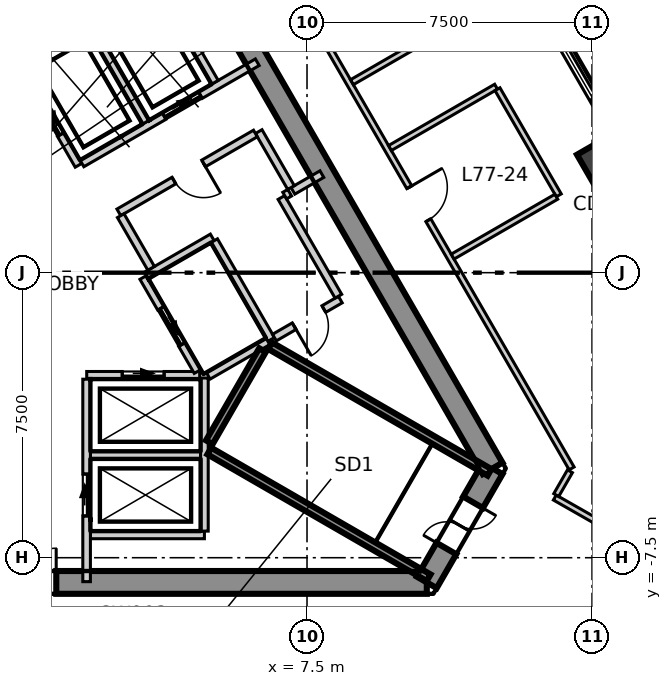
"""IFC4 building model, lengths in metres.
Left out: names, types, materials, properties, quantities, classifications, styles, units other than length and angle.
Written with IfcOpenShell. Run it as: python <this file> out.ifc"""

import sys

from ifc_helpers import new_model, si_unit, direction, frame, frame_2d, origin, origin_2d, place, context, subcontext, project, spatial, polyline, rectangle, outline, extrude, element, fill, save


model = new_model("IFC4")
c1 = context("Model", 3, precision=1e-05, world=origin(), true_north=direction((0.0, 1.0)))
c2 = subcontext(c1, "Body", "Model", "MODEL_VIEW")
j1 = project(units=[si_unit("LENGTHUNIT", "METRE"), si_unit("PLANEANGLEUNIT", "RADIAN")], contexts=[c1])
p1 = place(None, origin())
s1 = spatial("IfcSite", under=j1, at=p1, CompositionType="ELEMENT")
p2 = place(p1, origin())
s2 = spatial("IfcBuilding", under=s1, at=p2, CompositionType="ELEMENT")
p3 = place(p2, frame((0.0, 0.0, 322.3)))
s3 = spatial("IfcBuildingStorey", under=s2, at=p3, CompositionType="ELEMENT", Elevation=322.3)
p4 = place(p3, frame((-10.652, -8.15, -0.3), z_axis=(0.0, 0.0, 1.0), x_axis=(1.0, 0.0, 0.0)))
e1 = element("IfcWall", 1, at=p4, inside=s3, PredefinedType="SHEAR", context=c2, shape_type="SweptSolid", body=[
    extrude(outline(polyline([(-0.173, -0.3), (1.795, -0.3), (3.763, -0.3), (5.731, -0.3), (7.7, -0.3), (9.668, -0.3), (11.636, -0.3), (13.604, -0.3), (15.573, -0.3), (17.541, -0.3), (19.509, -0.3), (21.477, -0.3), (21.131, 0.3), (19.226, 0.3), (17.321, 0.3), (15.415, 0.3), (13.51, 0.3), (11.605, 0.3), (9.699, 0.3), (7.794, 0.3), (5.889, 0.3), (3.984, 0.3), (2.078, 0.3), (0.173, 0.3), (-0.173, -0.3)])), origin(), (0.0, 0.0, 1.0), 5.35),
])
p5 = place(p4, frame((9.752, 0.0, 0.3)))
e2 = element("IfcOpeningElement", 2, at=p5, cuts=e1, PredefinedType="OPENING", context=c2, shape_type="SweptSolid", body=[
    extrude(rectangle(XDim=1.8, YDim=2.1, at=frame_2d((0.9, 1.05))), frame((0.0, 0.31, 0.0), z_axis=(0.0, -1.0, 0.0), x_axis=(1.0, 0.0, 0.0)), (0.0, 0.0, 1.0), 0.62),
])
p6 = place(p4, frame((4.026, 0.0, 0.3)))
e3 = element("IfcOpeningElement", 3, at=p6, cuts=e1, PredefinedType="OPENING", context=c2, shape_type="SweptSolid", body=[
    extrude(rectangle(XDim=0.9, YDim=2.1, at=frame_2d((0.45, 1.05))), frame((0.0, 0.31, 0.0), z_axis=(0.0, -1.0, 0.0), x_axis=(1.0, 0.0, 0.0)), (0.0, 0.0, 1.0), 0.62),
])
p7 = place(p3, frame((10.652, -8.15, -0.3), z_axis=(0.0, 0.0, 1.0), x_axis=(0.49997462182, 0.866040055388, 0.0)))
e4 = element("IfcWall", 4, at=p7, inside=s3, PredefinedType="SHEAR", context=c2, shape_type="SweptSolid", body=[
    extrude(outline(polyline([(-0.173, -0.3), (1.732, -0.301), (3.638, -0.301), (3.291, 0.3), (1.732, 0.3), (0.173, 0.3), (-0.173, -0.3)])), origin(), (0.0, 0.0, 1.0), 5.35),
])
p8 = place(p7, frame((1.032, 0.0, 0.3)))
e5 = element("IfcOpeningElement", 5, at=p8, cuts=e4, PredefinedType="OPENING", context=c2, shape_type="SweptSolid", body=[
    extrude(rectangle(XDim=1.4, YDim=2.1, at=frame_2d((0.7, 1.05))), frame((0.0, 0.31, 0.0), z_axis=(0.0, -1.0, 0.0), x_axis=(1.0, 0.0, 0.0)), (0.0, 0.0, 1.0), 0.621),
])
p9 = place(p3, frame((12.384, -5.15, -0.3), z_axis=(0.0, 0.0, 1.0), x_axis=(-0.500000539815, 0.866025092122, 0.0)))
e6 = element("IfcWall", 6, at=p9, inside=s3, PredefinedType="SHEAR", context=c2, shape_type="SweptSolid", body=[
    extrude(outline(polyline([(-0.173, -0.301), (1.795, -0.301), (3.763, -0.301), (5.731, -0.301), (7.7, -0.301), (9.668, -0.301), (11.636, -0.301), (13.604, -0.3), (15.573, -0.3), (17.541, -0.3), (19.509, -0.3), (21.477, -0.3), (21.131, 0.3), (19.226, 0.3), (17.321, 0.3), (15.415, 0.3), (13.51, 0.3), (11.605, 0.3), (9.699, 0.3), (7.794, 0.3), (5.889, 0.3), (3.984, 0.3), (2.078, 0.3), (0.173, 0.3), (-0.173, -0.301)])), origin(), (0.0, 0.0, 1.0), 5.35),
])
p10 = place(p9, frame((16.378, 0.0, 0.3)))
e7 = element("IfcOpeningElement", 7, at=p10, cuts=e6, PredefinedType="OPENING", context=c2, shape_type="SweptSolid", body=[
    extrude(rectangle(XDim=0.9, YDim=2.1, at=frame_2d((0.45, 1.05))), frame((0.0, 0.31, 0.0), z_axis=(0.0, -1.0, 0.0), x_axis=(1.0, 0.0, 0.0)), (0.0, 0.0, 1.0), 0.621),
])
p11 = place(p3, frame((15.201, 2.871, -0.3), z_axis=(0.0, 0.0, 1.0), x_axis=(-0.5, 0.866025403784, 0.0)))
e8 = element("IfcColumn", 8, at=p11, inside=s3, PredefinedType="COLUMN", context=c2, shape_type="SweptSolid", body=[
    extrude(rectangle(XDim=1.0, YDim=0.8, at=origin_2d()), origin(), (0.0, 0.0, 1.0), 5.35),
])
p12 = place(p3, frame((2.771, 15.1, 0.0), z_axis=(0.0, 0.0, 1.0), x_axis=(0.500017691629, -0.866015189277, 0.0)))
e9 = element("IfcWall", 9, at=p12, inside=s3, PredefinedType="PARTITIONING", context=c2, shape_type="SweptSolid", body=[
    extrude(rectangle(XDim=23.383, YDim=0.15, at=frame_2d((11.691, 0.0))), origin(), (0.0, 0.0, 1.0), 5.05),
])
p13 = place(p12, frame((14.841, 0.0, 0.0)))
e10 = element("IfcOpeningElement", 10, at=p13, cuts=e9, PredefinedType="OPENING", context=c2, shape_type="SweptSolid", body=[
    extrude(rectangle(XDim=1.0, YDim=2.1, at=frame_2d((0.5, 1.05))), frame((0.0, 0.085, 0.0), z_axis=(0.0, -1.0, 0.0), x_axis=(1.0, 0.0, 0.0)), (0.0, 0.0, 1.0), 0.17),
])
p14 = place(p12, frame((5.246, 0.0, 0.0)))
e11 = element("IfcOpeningElement", 11, at=p14, cuts=e9, PredefinedType="OPENING", context=c2, shape_type="SweptSolid", body=[
    extrude(rectangle(XDim=1.2, YDim=2.1, at=frame_2d((0.6, 1.05))), frame((0.0, 0.085, 0.0), z_axis=(0.0, -1.0, 0.0), x_axis=(1.0, 0.0, 0.0)), (0.0, 0.0, 1.0), 0.17),
])
p15 = place(p3, frame((8.682, 5.012, 0.0), z_axis=(0.0, 0.0, 1.0), x_axis=(0.865981328726, 0.500076332472, 0.0)))
e12 = element("IfcWall", 12, at=p15, inside=s3, PredefinedType="PARTITIONING", context=c2, shape_type="SweptSolid", body=[
    extrude(rectangle(XDim=5.275, YDim=0.15, at=frame_2d((2.638, 0.0))), origin(), (0.0, 0.0, 1.0), 5.05),
])
p16 = place(p3, frame((9.682, 3.28, 0.0), z_axis=(0.0, 0.0, 1.0), x_axis=(0.86597507116, 0.50008716853, 0.0)))
e13 = element("IfcWall", 13, at=p16, inside=s3, PredefinedType="PARTITIONING", context=c2, shape_type="SweptSolid", body=[
    extrude(rectangle(XDim=3.226, YDim=0.15, at=frame_2d((1.613, 0.0))), origin(), (0.0, 0.0, 1.0), 5.05),
])
p17 = place(p3, frame((12.512, 4.828, 0.0), z_axis=(0.0, 0.0, 1.0), x_axis=(0.50011994908, -0.865956140074, 0.0)))
e14 = element("IfcWall", 14, at=p17, inside=s3, PredefinedType="PARTITIONING", context=c2, shape_type="SweptSolid", body=[
    extrude(rectangle(XDim=3.225, YDim=0.15, at=frame_2d((1.613, 0.0))), origin(), (0.0, 0.0, 1.0), 5.05),
])
p18 = place(p3, frame((11.332, 0.423, 0.0), z_axis=(0.0, 0.0, 1.0), x_axis=(0.866035871367, 0.499981869177, 0.0)))
e15 = element("IfcWall", 15, at=p18, inside=s3, PredefinedType="PARTITIONING", context=c2, shape_type="SweptSolid", body=[
    extrude(rectangle(XDim=3.15, YDim=0.15, at=frame_2d((1.575, 0.0))), origin(), (0.0, 0.0, 1.0), 5.05),
])
p19 = place(p3, frame((14.02, -5.917, 0.0), z_axis=(0.0, 0.0, 1.0), x_axis=(0.868887676317, -0.495009298846, 0.0)))
e16 = element("IfcWall", 16, at=p19, inside=s3, PredefinedType="PARTITIONING", context=c2, shape_type="SweptSolid", body=[
    extrude(rectangle(XDim=10.501, YDim=0.15, at=frame_2d((5.25, 0.0))), origin(), (0.0, 0.0, 1.0), 5.05),
])
p20 = place(p19, frame((4.75, 0.0, 0.0)))
e17 = element("IfcOpeningElement", 17, at=p20, cuts=e16, PredefinedType="OPENING", context=c2, shape_type="SweptSolid", body=[
    extrude(rectangle(XDim=1.0, YDim=2.1, at=frame_2d((0.5, 1.05))), frame((0.0, 0.085, 0.0), z_axis=(0.0, -1.0, 0.0), x_axis=(1.0, 0.0, 0.0)), (0.0, 0.0, 1.0), 0.17),
])
p21 = place(p3, frame((14.058, -5.852, 0.0), z_axis=(0.0, 0.0, 1.0), x_axis=(0.498826179569, 0.866702049482, 0.0)))
e18 = element("IfcWall", 18, at=p21, inside=s3, PredefinedType="PARTITIONING", context=c2, shape_type="SweptSolid", body=[
    extrude(rectangle(XDim=0.723, YDim=0.15, at=frame_2d((0.362, 0.0))), origin(), (0.0, 0.0, 1.0), 5.05),
])
p22 = place(p3, frame((1.8, -4.8, 0.0), z_axis=(0.0, 0.0, 1.0), x_axis=(1.0, 0.0, 0.0)))
e19 = element("IfcWall", 19, at=p22, inside=s3, PredefinedType="SOLIDWALL", context=c2, shape_type="SweptSolid", body=[
    extrude(rectangle(XDim=2.9, YDim=0.2, at=frame_2d((1.45, 0.0))), origin(), (0.0, 0.0, 1.0), 5.05),
])
p23 = place(p3, frame((1.8, -6.9, 0.0), z_axis=(0.0, 0.0, 1.0), x_axis=(1.0, 0.0, 0.0)))
e20 = element("IfcWall", 20, at=p23, inside=s3, PredefinedType="SOLIDWALL", context=c2, shape_type="SweptSolid", body=[
    extrude(rectangle(XDim=3.0, YDim=0.2, at=frame_2d((1.5, 0.0))), origin(), (0.0, 0.0, 1.0), 5.05),
])
p24 = place(p3, frame((1.703, -2.7, 0.0), z_axis=(0.0, 0.0, 1.0), x_axis=(1.0, 0.0, 0.0)))
e21 = element("IfcWall", 21, at=p24, inside=s3, PredefinedType="SOLIDWALL", context=c2, shape_type="SweptSolid", body=[
    extrude(rectangle(XDim=2.973, YDim=0.2, at=frame_2d((1.487, 0.0))), origin(), (0.0, 0.0, 1.0), 5.05),
])
p25 = place(p24, frame((0.936, 0.0, 0.0)))
e22 = element("IfcOpeningElement", 22, at=p25, cuts=e21, PredefinedType="OPENING", context=c2, shape_type="SweptSolid", body=[
    extrude(rectangle(XDim=1.1, YDim=2.1, at=frame_2d((0.55, 1.05))), frame((0.0, 0.11, 0.0), z_axis=(0.0, -1.0, 0.0), x_axis=(1.0, 0.0, 0.0)), (0.0, 0.0, 1.0), 0.22),
])
p26 = place(p3, frame((-0.002, 5.542, 0.0), z_axis=(0.0, 0.0, 1.0), x_axis=(0.866103910842, 0.499863997127, 0.0)))
e23 = element("IfcWall", 23, at=p26, inside=s3, PredefinedType="SOLIDWALL", context=c2, shape_type="SweptSolid", body=[
    extrude(rectangle(XDim=4.131, YDim=0.2, at=frame_2d((2.065, 0.0))), origin(), (0.0, 0.0, 1.0), 5.05),
])
p27 = place(p3, frame((0.0, 5.4, 0.0), z_axis=(0.0, 0.0, 1.0), x_axis=(0.500103862429, -0.865965430478, 0.0)))
e24 = element("IfcWall", 24, at=p27, inside=s3, PredefinedType="SOLIDWALL", context=c2, shape_type="SweptSolid", body=[
    extrude(rectangle(XDim=2.973, YDim=0.2, at=frame_2d((1.487, 0.0))), origin(), (0.0, 0.0, 1.0), 5.05),
])
p28 = place(p27, frame((0.937, 0.0, 0.0)))
e25 = element("IfcOpeningElement", 25, at=p28, cuts=e24, PredefinedType="OPENING", context=c2, shape_type="SweptSolid", body=[
    extrude(rectangle(XDim=1.1, YDim=2.1, at=frame_2d((0.55, 1.05))), frame((0.0, 0.11, 0.0), z_axis=(0.0, -1.0, 0.0), x_axis=(1.0, 0.0, 0.0)), (0.0, 0.0, 1.0), 0.22),
])
p29 = place(p3, frame((3.19, -0.125, 0.0), z_axis=(0.0, 0.0, 1.0), x_axis=(0.499988658015, -0.866031951983, 0.0)))
e26 = element("IfcWall", 26, at=p29, inside=s3, PredefinedType="SOLIDWALL", context=c2, shape_type="SweptSolid", body=[
    extrude(rectangle(XDim=2.858, YDim=0.2, at=frame_2d((1.429, 0.0))), origin(), (0.0, 0.0, 1.0), 5.05),
])
p30 = place(p29, frame((0.936, 0.0, 0.0)))
e27 = element("IfcOpeningElement", 27, at=p30, cuts=e26, PredefinedType="OPENING", context=c2, shape_type="SweptSolid", body=[
    extrude(rectangle(XDim=1.1, YDim=2.1, at=frame_2d((0.55, 1.05))), frame((0.0, 0.11, 0.0), z_axis=(0.0, -1.0, 0.0), x_axis=(1.0, 0.0, 0.0)), (0.0, 0.0, 1.0), 0.22),
])
p31 = place(p3, frame((1.578, 2.874, 0.0), z_axis=(0.0, 0.0, 1.0), x_axis=(0.866045911672, 0.499964477614, 0.0)))
e28 = element("IfcWall", 28, at=p31, inside=s3, PredefinedType="SOLIDWALL", context=c2, shape_type="SweptSolid", body=[
    extrude(rectangle(XDim=5.327, YDim=0.2, at=frame_2d((2.663, 0.0))), origin(), (0.0, 0.0, 1.0), 5.05),
])
p32 = place(p31, frame((2.496, 0.0, 0.0)))
e29 = element("IfcOpeningElement", 29, at=p32, cuts=e28, PredefinedType="OPENING", context=c2, shape_type="SweptSolid", body=[
    extrude(rectangle(XDim=1.1, YDim=2.1, at=frame_2d((0.55, 1.05))), frame((0.0, 0.11, 0.0), z_axis=(0.0, -1.0, 0.0), x_axis=(1.0, 0.0, 0.0)), (0.0, 0.0, 1.0), 0.22),
])
p33 = place(p3, frame((1.7, -8.13, 0.0), z_axis=(0.0, 0.0, 1.0), x_axis=(0.0, 1.0, 0.0)))
e30 = element("IfcWall", 30, at=p33, inside=s3, PredefinedType="SOLIDWALL", context=c2, shape_type="SweptSolid", body=[
    extrude(rectangle(XDim=5.327, YDim=0.2, at=frame_2d((2.664, 0.0))), origin(), (0.0, 0.0, 1.0), 5.05),
])
p34 = place(p33, frame((1.73, 0.0, 0.0)))
e31 = element("IfcOpeningElement", 31, at=p34, cuts=e30, PredefinedType="OPENING", context=c2, shape_type="SweptSolid", body=[
    extrude(rectangle(XDim=1.1, YDim=2.1, at=frame_2d((0.55, 1.05))), frame((0.0, 0.11, 0.0), z_axis=(0.0, -1.0, 0.0), x_axis=(1.0, 0.0, 0.0)), (0.0, 0.0, 1.0), 0.22),
])
p35 = place(p3, frame((4.8, -6.8, 0.0), z_axis=(0.0, 0.0, 1.0), x_axis=(0.0, 1.0, 0.0)))
e32 = element("IfcWall", 32, at=p35, inside=s3, PredefinedType="SOLIDWALL", context=c2, shape_type="SweptSolid", body=[
    extrude(rectangle(XDim=4.029, YDim=0.2, at=frame_2d((2.015, 0.0))), origin(), (0.0, 0.0, 1.0), 5.05),
])
p36 = place(p3, frame((3.278, -0.071, 0.0), z_axis=(0.0, 0.0, 1.0), x_axis=(0.865855657918, 0.500293893279, 0.0)))
e33 = element("IfcWall", 33, at=p36, inside=s3, PredefinedType="SOLIDWALL", context=c2, shape_type="SweptSolid", body=[
    extrude(rectangle(XDim=1.997, YDim=0.2, at=frame_2d((0.999, 0.0))), origin(), (0.0, 0.0, 1.0), 5.05),
])
p37 = place(p3, frame((7.129, 2.153, 0.0), z_axis=(0.0, 0.0, 1.0), x_axis=(0.866083962871, 0.499898558967, 0.0)))
e34 = element("IfcWall", 34, at=p37, inside=s3, PredefinedType="SOLIDWALL", context=c2, shape_type="SweptSolid", body=[
    extrude(rectangle(XDim=0.88, YDim=0.2, at=frame_2d((0.44, 0.0))), origin(), (0.0, 0.0, 1.0), 5.05),
])
for number, where, z_axis, x_axis in (
    (35, (3.626, 7.52, 0.0), (0.0, 0.0, 1.0), (0.5, -0.866, 0.0)),
    (36, (1.807, 6.47, 0.0), (0.0, 0.0, 1.0), (0.5, -0.866, 0.0)),
):
    element("IfcWall", number, at=place(p3, frame(where, z_axis=z_axis, x_axis=x_axis)), inside=s3, PredefinedType="SOLIDWALL", context=c2, shape_type="SweptSolid", body=[
        extrude(rectangle(XDim=2.9, YDim=0.2, at=frame_2d((1.45, 0.0))), origin(), (0.0, 0.0, 1.0), 5.05),
    ])
p38 = place(p3, frame((5.057, 0.841, 0.0), z_axis=(0.0, 0.0, 1.0), x_axis=(0.499990139034, -0.866031096941, 0.0)))
e37 = element("IfcWall", 37, at=p38, inside=s3, PredefinedType="SOLIDWALL", context=c2, shape_type="SweptSolid", body=[
    extrude(rectangle(XDim=3.0, YDim=0.2, at=frame_2d((1.5, 0.0))), origin(), (0.0, 0.0, 1.0), 5.05),
])
p39 = place(p3, frame((4.9, -2.714, 0.0), z_axis=(0.0, 0.0, 1.0), x_axis=(0.865846928409, 0.500309001083, 0.0)))
e38 = element("IfcWall", 38, at=p39, inside=s3, PredefinedType="SOLIDWALL", context=c2, shape_type="SweptSolid", body=[
    extrude(rectangle(XDim=1.813, YDim=0.2, at=frame_2d((0.907, 0.0))), origin(), (0.0, 0.0, 1.0), 5.05),
])
p40 = place(p3, frame((6.229, 3.712, 0.0), z_axis=(0.0, 0.0, 1.0), x_axis=(0.499875724984, -0.86609714211, 0.0)))
e39 = element("IfcWall", 39, at=p40, inside=s3, PredefinedType="SOLIDWALL", context=c2, shape_type="SweptSolid", body=[
    extrude(rectangle(XDim=1.701, YDim=0.2, at=frame_2d((0.85, 0.0))), origin(), (0.0, 0.0, 1.0), 5.05),
])
p41 = place(p3, frame((2.548, 1.587, 0.0), z_axis=(0.0, 0.0, 1.0), x_axis=(0.866004344652, 0.500036473714, 0.0)))
e40 = element("IfcWall", 40, at=p41, inside=s3, PredefinedType="SOLIDWALL", context=c2, shape_type="SweptSolid", body=[
    extrude(rectangle(XDim=4.15, YDim=0.2, at=frame_2d((2.075, 0.0))), origin(), (0.0, 0.0, 1.0), 5.05),
])
p42 = place(p41, frame((1.675, 0.0, 0.0)))
e41 = element("IfcOpeningElement", 41, at=p42, cuts=e40, PredefinedType="OPENING", context=c2, shape_type="SweptSolid", body=[
    extrude(rectangle(XDim=0.9, YDim=2.1, at=frame_2d((0.45, 1.05))), frame((0.0, 0.11, 0.0), z_axis=(0.0, -1.0, 0.0), x_axis=(1.0, 0.0, 0.0)), (0.0, 0.0, 1.0), 0.22),
])
p43 = place(p3, frame((2.598, 1.5, 0.0), z_axis=(0.0, 0.0, 1.0), x_axis=(0.499929347863, -0.866066190972, 0.0)))
e42 = element("IfcWall", 42, at=p43, inside=s3, PredefinedType="SOLIDWALL", context=c2, shape_type="SweptSolid", body=[
    extrude(rectangle(XDim=1.6, YDim=0.2, at=frame_2d((0.8, 0.0))), origin(), (0.0, 0.0, 1.0), 5.05),
])
p44 = place(p3, frame((6.642, -1.708, 0.0), z_axis=(0.0, 0.0, 1.0), x_axis=(0.866043441391, 0.499968756647, 0.0)))
e43 = element("IfcWall", 43, at=p44, inside=s3, PredefinedType="SOLIDWALL", context=c2, shape_type="SweptSolid", body=[
    extrude(rectangle(XDim=2.002, YDim=0.2, at=frame_2d((1.001, 0.0))), origin(), (0.0, 0.0, 1.0), 5.05),
])
p45 = place(p44, frame((0.601, 0.0, 0.0)))
e44 = element("IfcOpeningElement", 44, at=p45, cuts=e43, PredefinedType="OPENING", context=c2, shape_type="SweptSolid", body=[
    extrude(rectangle(XDim=0.9, YDim=2.1, at=frame_2d((0.45, 1.05))), frame((0.0, 0.11, 0.0), z_axis=(0.0, -1.0, 0.0), x_axis=(1.0, 0.0, 0.0)), (0.0, 0.0, 1.0), 0.22),
])
p46 = place(p3, frame((6.826, 1.978, 0.0), z_axis=(0.0, 0.0, 1.0), x_axis=(0.499990139034, -0.866031096941, 0.0)))
e45 = element("IfcWall", 45, at=p46, inside=s3, PredefinedType="SOLIDWALL", context=c2, shape_type="SweptSolid", body=[
    extrude(rectangle(XDim=3.0, YDim=0.2, at=frame_2d((1.5, 0.0))), origin(), (0.0, 0.0, 1.0), 5.05),
])
p47 = place(p3, frame((6.912, 2.028, 0.0), z_axis=(0.0, 0.0, 1.0), x_axis=(0.866559367082, 0.499074005857, 0.0)))
e46 = element("IfcWall", 46, at=p47, inside=s3, PredefinedType="SOLIDWALL", context=c2, shape_type="SweptSolid", body=[
    extrude(rectangle(XDim=0.152, YDim=0.2, at=frame_2d((0.076, 0.0))), origin(), (0.0, 0.0, 1.0), 5.05),
])
p48 = place(p3, frame((4.929, -4.693, 0.0), z_axis=(0.0, 0.0, 1.0), x_axis=(0.866005022404, -0.500035299925, 0.0)))
e47 = element("IfcWall", 47, at=p48, inside=s3, PredefinedType="SOLIDWALL", context=c2, shape_type="SweptSolid", body=[
    extrude(rectangle(XDim=6.665, YDim=0.2, at=frame_2d((3.333, 0.0))), origin(), (0.0, 0.0, 1.0), 5.05),
])
p49 = place(p3, frame((4.929, -4.462, 0.0), z_axis=(0.0, 0.0, 1.0), x_axis=(0.500200581029, 0.865909567298, 0.0)))
e48 = element("IfcWall", 48, at=p49, inside=s3, PredefinedType="SOLIDWALL", context=c2, shape_type="SweptSolid", body=[
    extrude(rectangle(XDim=2.799, YDim=0.2, at=frame_2d((1.399, 0.0))), origin(), (0.0, 0.0, 1.0), 5.05),
])
p50 = place(p3, frame((6.529, -1.922, 0.0), z_axis=(0.0, 0.0, 1.0), x_axis=(0.866068467981, -0.499925403204, 0.0)))
e49 = element("IfcWall", 49, at=p50, inside=s3, PredefinedType="SOLIDWALL", context=c2, shape_type="SweptSolid", body=[
    extrude(rectangle(XDim=6.665, YDim=0.2, at=frame_2d((3.332, 0.0))), origin(), (0.0, 0.0, 1.0), 5.05),
])
p51 = place(p30, origin())
e50 = element("IfcDoor", 50, at=p51, inside=s3, OperationType="SLIDING_TO_LEFT", PredefinedType="DOOR", context=c2, shape_type="SweptSolid", body=[
    extrude(rectangle(XDim=1.1, YDim=2.1, at=frame_2d((0.55, 1.05))), frame((0.0, 0.025, 0.0), z_axis=(0.0, -1.0, 0.0), x_axis=(1.0, 0.0, 0.0)), (0.0, 0.0, 1.0), 0.05),
])
fill(e27, e50)
p52 = place(p25, origin())
e51 = element("IfcDoor", 51, at=p52, inside=s3, OperationType="SLIDING_TO_LEFT", PredefinedType="DOOR", context=c2, shape_type="SweptSolid", body=[
    extrude(rectangle(XDim=1.1, YDim=2.1, at=frame_2d((0.55, 1.05))), frame((0.0, 0.025, 0.0), z_axis=(0.0, -1.0, 0.0), x_axis=(1.0, 0.0, 0.0)), (0.0, 0.0, 1.0), 0.05),
])
fill(e22, e51)
p53 = place(p34, origin())
e52 = element("IfcDoor", 52, at=p53, inside=s3, OperationType="SLIDING_TO_LEFT", PredefinedType="DOOR", context=c2, shape_type="SweptSolid", body=[
    extrude(rectangle(XDim=1.1, YDim=2.1, at=frame_2d((0.55, 1.05))), frame((0.0, 0.025, 0.0), z_axis=(0.0, -1.0, 0.0), x_axis=(1.0, 0.0, 0.0)), (0.0, 0.0, 1.0), 0.05),
])
fill(e31, e52)
p54 = place(p28, origin())
e53 = element("IfcDoor", 53, at=p54, inside=s3, OperationType="SLIDING_TO_LEFT", PredefinedType="DOOR", context=c2, shape_type="SweptSolid", body=[
    extrude(rectangle(XDim=1.1, YDim=2.1, at=frame_2d((0.55, 1.05))), frame((0.0, 0.025, 0.0), z_axis=(0.0, -1.0, 0.0), x_axis=(1.0, 0.0, 0.0)), (0.0, 0.0, 1.0), 0.05),
])
fill(e25, e53)
p55 = place(p32, origin())
e54 = element("IfcDoor", 54, at=p55, inside=s3, OperationType="SLIDING_TO_LEFT", PredefinedType="DOOR", context=c2, shape_type="SweptSolid", body=[
    extrude(rectangle(XDim=1.1, YDim=2.1, at=frame_2d((0.55, 1.05))), frame((0.0, 0.025, 0.0), z_axis=(0.0, -1.0, 0.0), x_axis=(1.0, 0.0, 0.0)), (0.0, 0.0, 1.0), 0.05),
])
fill(e29, e54)
p56 = place(p13, origin())
e55 = element("IfcDoor", 55, at=p56, inside=s3, OperationType="SINGLE_SWING_RIGHT", PredefinedType="DOOR", context=c2, shape_type="SweptSolid", body=[
    extrude(rectangle(XDim=1.0, YDim=2.1, at=frame_2d((0.5, 1.05))), frame((0.0, 0.025, 0.0), z_axis=(0.0, -1.0, 0.0), x_axis=(1.0, 0.0, 0.0)), (0.0, 0.0, 1.0), 0.05),
])
fill(e10, e55)
p57 = place(p5, origin())
e56 = element("IfcDoor", 56, at=p57, inside=s3, OperationType="DOUBLE_DOOR_SINGLE_SWING", PredefinedType="DOOR", context=c2, shape_type="SweptSolid", body=[
    extrude(rectangle(XDim=1.8, YDim=2.1, at=frame_2d((0.9, 1.05))), frame((0.0, 0.025, 0.0), z_axis=(0.0, -1.0, 0.0), x_axis=(1.0, 0.0, 0.0)), (0.0, 0.0, 1.0), 0.05),
])
fill(e2, e56)
p58 = place(p8, origin())
e57 = element("IfcDoor", 57, at=p58, inside=s3, OperationType="DOUBLE_DOOR_SINGLE_SWING", PredefinedType="DOOR", context=c2, shape_type="SweptSolid", body=[
    extrude(rectangle(XDim=1.4, YDim=2.1, at=frame_2d((0.7, 1.05))), frame((0.0, 0.025, 0.0), z_axis=(0.0, -1.0, 0.0), x_axis=(1.0, 0.0, 0.0)), (0.0, 0.0, 1.0), 0.05),
])
fill(e5, e57)
p59 = place(p45, origin())
e58 = element("IfcDoor", 58, at=p59, inside=s3, OperationType="SINGLE_SWING_LEFT", PredefinedType="DOOR", context=c2, shape_type="SweptSolid", body=[
    extrude(rectangle(XDim=0.9, YDim=2.1, at=frame_2d((0.45, 1.05))), frame((0.0, 0.025, 0.0), z_axis=(0.0, -1.0, 0.0), x_axis=(1.0, 0.0, 0.0)), (0.0, 0.0, 1.0), 0.05),
])
fill(e44, e58)
p60 = place(p42, origin())
e59 = element("IfcDoor", 59, at=p60, inside=s3, OperationType="SINGLE_SWING_RIGHT", PredefinedType="DOOR", context=c2, shape_type="SweptSolid", body=[
    extrude(rectangle(XDim=0.9, YDim=2.1, at=frame_2d((0.45, 1.05))), frame((0.0, 0.025, 0.0), z_axis=(0.0, -1.0, 0.0), x_axis=(1.0, 0.0, 0.0)), (0.0, 0.0, 1.0), 0.05),
])
fill(e41, e59)
save(model, sys.argv[1])
